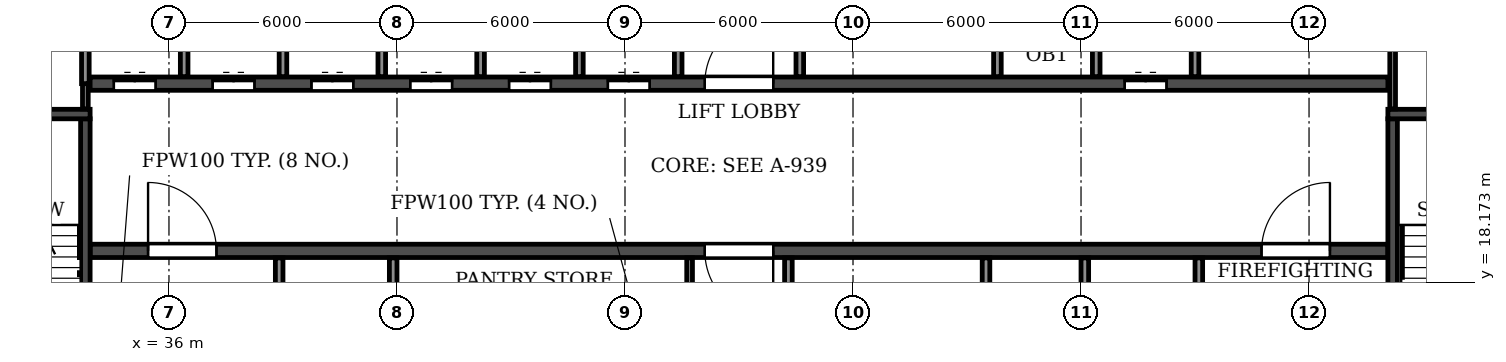
"""IFC4 building model, lengths in metres.
Left out: names, types, materials, properties, quantities, classifications, styles, units other than length and angle.
Written with IfcOpenShell. Run it as: python <this file> out.ifc"""

import sys

from ifc_helpers import new_model, si_unit, direction, frame, frame_2d, origin, place, context, subcontext, project, spatial, rectangle, extrude, element, fill, save


model = new_model("IFC4")
c1 = context("Model", 3, precision=1e-05, world=origin(), true_north=direction((0.0, 1.0)))
c2 = subcontext(c1, "Body", "Model", "MODEL_VIEW")
j1 = project(units=[si_unit("LENGTHUNIT", "METRE"), si_unit("PLANEANGLEUNIT", "RADIAN")], contexts=[c1])
p1 = place(None, origin())
s1 = spatial("IfcSite", under=j1, at=p1, CompositionType="ELEMENT")
p2 = place(p1, origin())
s2 = spatial("IfcBuilding", under=s1, at=p2, CompositionType="ELEMENT")
p3 = place(p2, frame((0.0, 0.0, 221.4)))
s3 = spatial("IfcBuildingStorey", under=s2, at=p3, CompositionType="ELEMENT", Elevation=221.4)
p4 = place(p3, frame((33.925, 19.0, 0.0), z_axis=(0.0, 0.0, 1.0), x_axis=(1.0, 0.0, 0.0)))
e1 = element("IfcWall", 1, at=p4, inside=s3, PredefinedType="SOLIDWALL", context=c2, shape_type="SweptSolid", body=[
    extrude(rectangle(XDim=34.15, YDim=0.35, at=frame_2d((17.075, 0.0))), origin(), (0.0, 0.0, 1.0), 3.08),
])
p5 = place(p4, frame((16.175, 0.0, 0.0)))
e2 = element("IfcOpeningElement", 2, at=p5, cuts=e1, PredefinedType="OPENING", context=c2, shape_type="SweptSolid", body=[
    extrude(rectangle(XDim=1.8, YDim=2.1, at=frame_2d((0.9, 1.05))), frame((0.0, 0.185, 0.0), z_axis=(0.0, -1.0, 0.0), x_axis=(1.0, 0.0, 0.0)), (0.0, 0.0, 1.0), 0.37),
])
p6 = place(p4, frame((1.525, 0.0, 0.0)))
e3 = element("IfcOpeningElement", 3, at=p6, cuts=e1, PredefinedType="OPENING", context=c2, shape_type="SweptSolid", body=[
    extrude(rectangle(XDim=1.8, YDim=2.1, at=frame_2d((0.9, 1.05))), frame((0.0, 0.185, 0.0), z_axis=(0.0, -1.0, 0.0), x_axis=(1.0, 0.0, 0.0)), (0.0, 0.0, 1.0), 0.37),
])
p7 = place(p4, frame((30.825, 0.0, 0.0)))
e4 = element("IfcOpeningElement", 4, at=p7, cuts=e1, PredefinedType="OPENING", context=c2, shape_type="SweptSolid", body=[
    extrude(rectangle(XDim=1.8, YDim=2.1, at=frame_2d((0.9, 1.05))), frame((0.0, 0.185, 0.0), z_axis=(0.0, -1.0, 0.0), x_axis=(1.0, 0.0, 0.0)), (0.0, 0.0, 1.0), 0.37),
])
p8 = place(p3, frame((33.925, 23.4, 0.0), z_axis=(0.0, 0.0, 1.0), x_axis=(1.0, 0.0, 0.0)))
e5 = element("IfcWall", 5, at=p8, inside=s3, PredefinedType="SOLIDWALL", context=c2, shape_type="SweptSolid", body=[
    extrude(rectangle(XDim=34.15, YDim=0.35, at=frame_2d((17.075, 0.0))), origin(), (0.0, 0.0, 1.0), 3.08),
])
p9 = place(p8, frame((16.175, 0.0, 0.0)))
e6 = element("IfcOpeningElement", 6, at=p9, cuts=e5, PredefinedType="OPENING", context=c2, shape_type="SweptSolid", body=[
    extrude(rectangle(XDim=1.8, YDim=2.1, at=frame_2d((0.9, 1.05))), frame((0.0, 0.185, 0.0), z_axis=(0.0, -1.0, 0.0), x_axis=(1.0, 0.0, 0.0)), (0.0, 0.0, 1.0), 0.37),
])
p10 = place(p8, frame((0.625, 0.0, 0.0)))
e7 = element("IfcOpeningElement", 7, at=p10, cuts=e5, PredefinedType="OPENING", context=c2, shape_type="SweptSolid", body=[
    extrude(rectangle(XDim=1.1, YDim=2.1, at=frame_2d((0.55, 1.05))), frame((0.0, 0.185, 0.0), z_axis=(0.0, -1.0, 0.0), x_axis=(1.0, 0.0, 0.0)), (0.0, 0.0, 1.0), 0.37),
])
p11 = place(p8, frame((3.225, 0.0, 0.0)))
e8 = element("IfcOpeningElement", 8, at=p11, cuts=e5, PredefinedType="OPENING", context=c2, shape_type="SweptSolid", body=[
    extrude(rectangle(XDim=1.1, YDim=2.1, at=frame_2d((0.55, 1.05))), frame((0.0, 0.185, 0.0), z_axis=(0.0, -1.0, 0.0), x_axis=(1.0, 0.0, 0.0)), (0.0, 0.0, 1.0), 0.37),
])
p12 = place(p8, frame((5.825, 0.0, 0.0)))
e9 = element("IfcOpeningElement", 9, at=p12, cuts=e5, PredefinedType="OPENING", context=c2, shape_type="SweptSolid", body=[
    extrude(rectangle(XDim=1.1, YDim=2.1, at=frame_2d((0.55, 1.05))), frame((0.0, 0.185, 0.0), z_axis=(0.0, -1.0, 0.0), x_axis=(1.0, 0.0, 0.0)), (0.0, 0.0, 1.0), 0.37),
])
p13 = place(p8, frame((8.425, 0.0, 0.0)))
e10 = element("IfcOpeningElement", 10, at=p13, cuts=e5, PredefinedType="OPENING", context=c2, shape_type="SweptSolid", body=[
    extrude(rectangle(XDim=1.1, YDim=2.1, at=frame_2d((0.55, 1.05))), frame((0.0, 0.185, 0.0), z_axis=(0.0, -1.0, 0.0), x_axis=(1.0, 0.0, 0.0)), (0.0, 0.0, 1.0), 0.37),
])
p14 = place(p8, frame((11.025, 0.0, 0.0)))
e11 = element("IfcOpeningElement", 11, at=p14, cuts=e5, PredefinedType="OPENING", context=c2, shape_type="SweptSolid", body=[
    extrude(rectangle(XDim=1.1, YDim=2.1, at=frame_2d((0.55, 1.05))), frame((0.0, 0.185, 0.0), z_axis=(0.0, -1.0, 0.0), x_axis=(1.0, 0.0, 0.0)), (0.0, 0.0, 1.0), 0.37),
])
p15 = place(p8, frame((13.625, 0.0, 0.0)))
e12 = element("IfcOpeningElement", 12, at=p15, cuts=e5, PredefinedType="OPENING", context=c2, shape_type="SweptSolid", body=[
    extrude(rectangle(XDim=1.1, YDim=2.1, at=frame_2d((0.55, 1.05))), frame((0.0, 0.185, 0.0), z_axis=(0.0, -1.0, 0.0), x_axis=(1.0, 0.0, 0.0)), (0.0, 0.0, 1.0), 0.37),
])
p16 = place(p8, frame((27.225, 0.0, 0.0)))
e13 = element("IfcOpeningElement", 13, at=p16, cuts=e5, PredefinedType="OPENING", context=c2, shape_type="SweptSolid", body=[
    extrude(rectangle(XDim=1.1, YDim=2.1, at=frame_2d((0.55, 1.05))), frame((0.0, 0.185, 0.0), z_axis=(0.0, -1.0, 0.0), x_axis=(1.0, 0.0, 0.0)), (0.0, 0.0, 1.0), 0.37),
])
p17 = place(p3, frame((33.8, 14.775, 0.0), z_axis=(0.0, 0.0, 1.0), x_axis=(0.0, 1.0, 0.0)))
e14 = element("IfcWall", 14, at=p17, inside=s3, PredefinedType="SOLIDWALL", context=c2, shape_type="SweptSolid", body=[
    extrude(rectangle(XDim=7.7, YDim=0.25, at=frame_2d((3.85, 0.0))), origin(), (0.0, 0.0, 1.0), 3.08),
])
p18 = place(p17, frame((0.525, 0.0, 0.0)))
e15 = element("IfcOpeningElement", 15, at=p18, cuts=e14, PredefinedType="OPENING", context=c2, shape_type="SweptSolid", body=[
    extrude(rectangle(XDim=1.0, YDim=2.1, at=frame_2d((0.5, 1.05))), frame((0.0, 0.135, 0.0), z_axis=(0.0, -1.0, 0.0), x_axis=(1.0, 0.0, 0.0)), (0.0, 0.0, 1.0), 0.27),
])
p19 = place(p3, frame((29.875, 22.6, 0.0), z_axis=(0.0, 0.0, 1.0), x_axis=(1.0, 0.0, 0.0)))
e16 = element("IfcWall", 16, at=p19, inside=s3, PredefinedType="SOLIDWALL", context=c2, shape_type="SweptSolid", body=[
    extrude(rectangle(XDim=4.05, YDim=0.25, at=frame_2d((2.025, 0.0))), origin(), (0.0, 0.0, 1.0), 3.08),
])
p20 = place(p3, frame((68.2, 14.775, 0.0), z_axis=(0.0, 0.0, 1.0), x_axis=(0.0, 1.0, 0.0)))
e17 = element("IfcWall", 17, at=p20, inside=s3, PredefinedType="SOLIDWALL", context=c2, shape_type="SweptSolid", body=[
    extrude(rectangle(XDim=7.7, YDim=0.25, at=frame_2d((3.85, 0.0))), origin(), (0.0, 0.0, 1.0), 3.08),
])
p21 = place(p20, frame((0.525, 0.0, 0.0)))
e18 = element("IfcOpeningElement", 18, at=p21, cuts=e17, PredefinedType="OPENING", context=c2, shape_type="SweptSolid", body=[
    extrude(rectangle(XDim=1.0, YDim=2.1, at=frame_2d((0.5, 1.05))), frame((0.0, 0.135, 0.0), z_axis=(0.0, -1.0, 0.0), x_axis=(1.0, 0.0, 0.0)), (0.0, 0.0, 1.0), 0.27),
])
p22 = place(p3, frame((68.075, 22.6, 0.0), z_axis=(0.0, 0.0, 1.0), x_axis=(1.0, 0.0, 0.0)))
e19 = element("IfcWall", 19, at=p22, inside=s3, PredefinedType="SOLIDWALL", context=c2, shape_type="SweptSolid", body=[
    extrude(rectangle(XDim=4.05, YDim=0.25, at=frame_2d((2.025, 0.0))), origin(), (0.0, 0.0, 1.0), 3.08),
])
p23 = place(p3, frame((49.7, 14.785, 0.0), z_axis=(0.0, 0.0, 1.0), x_axis=(0.0, 1.0, 0.0)))
e20 = element("IfcWall", 20, at=p23, inside=s3, PredefinedType="PARTITIONING", context=c2, shape_type="SweptSolid", body=[
    extrude(rectangle(XDim=4.03, YDim=0.15, at=frame_2d((2.015, 0.0))), origin(), (0.0, 0.0, 1.0), 3.08),
])
for number, where, z_axis, x_axis in (
    (21, (52.3, 14.785, 0.0), (0.0, 0.0, 1.0), (0.0, 1.0, 0.0)),
    (22, (52.6, 23.585, 0.0), (0.0, 0.0, 1.0), (0.0, 1.0, 0.0)),
    (23, (57.5, 14.785, 0.0), (0.0, 0.0, 1.0), (0.0, 1.0, 0.0)),
):
    element("IfcWall", number, at=place(p3, frame(where, z_axis=z_axis, x_axis=x_axis)), inside=s3, PredefinedType="PARTITIONING", context=c2, shape_type="SweptSolid", body=[
        extrude(rectangle(XDim=4.03, YDim=0.2, at=frame_2d((2.015, 0.0))), origin(), (0.0, 0.0, 1.0), 3.08),
    ])
p24 = place(p3, frame((33.8, 22.735, 0.0), z_axis=(0.0, 0.0, 1.0), x_axis=(0.0, 1.0, 0.0)))
e24 = element("IfcWall", 24, at=p24, inside=s3, PredefinedType="PARTITIONING", context=c2, shape_type="SweptSolid", body=[
    extrude(rectangle(XDim=0.665, YDim=0.15, at=frame_2d((0.333, 0.0))), origin(), (0.0, 0.0, 1.0), 3.08),
])
p25 = place(p3, frame((68.2, 22.735, 0.0), z_axis=(0.0, 0.0, 1.0), x_axis=(0.0, 1.0, 0.0)))
e25 = element("IfcWall", 25, at=p25, inside=s3, PredefinedType="PARTITIONING", context=c2, shape_type="SweptSolid", body=[
    extrude(rectangle(XDim=4.88, YDim=0.15, at=frame_2d((2.44, 0.0))), origin(), (0.0, 0.0, 1.0), 3.08),
])
p26 = place(p3, frame((33.8, 23.4, 0.0), z_axis=(0.0, 0.0, 1.0), x_axis=(0.0, 1.0, 0.0)))
e26 = element("IfcWall", 26, at=p26, inside=s3, PredefinedType="PARTITIONING", context=c2, shape_type="SweptSolid", body=[
    extrude(rectangle(XDim=2.7, YDim=0.2, at=frame_2d((1.35, 0.0))), origin(), (0.0, 0.0, 1.0), 3.08),
])
p27 = place(p3, frame((36.4, 23.585, 0.0), z_axis=(0.0, 0.0, 1.0), x_axis=(0.0, 1.0, 0.0)))
e27 = element("IfcWall", 27, at=p27, inside=s3, PredefinedType="PARTITIONING", context=c2, shape_type="SweptSolid", body=[
    extrude(rectangle(XDim=2.515, YDim=0.2, at=frame_2d((1.258, 0.0))), origin(), (0.0, 0.0, 1.0), 3.08),
])
p28 = place(p3, frame((38.9, 14.785, 0.0), z_axis=(0.0, 0.0, 1.0), x_axis=(0.0, 1.0, 0.0)))
e28 = element("IfcWall", 28, at=p28, inside=s3, PredefinedType="PARTITIONING", context=c2, shape_type="SweptSolid", body=[
    extrude(rectangle(XDim=4.03, YDim=0.2, at=frame_2d((2.015, 0.0))), origin(), (0.0, 0.0, 1.0), 3.08),
])
p29 = place(p28, frame((1.465, 0.0, 0.0)))
e29 = element("IfcOpeningElement", 29, at=p29, cuts=e28, PredefinedType="OPENING", context=c2, shape_type="SweptSolid", body=[
    extrude(rectangle(XDim=1.1, YDim=2.1, at=frame_2d((0.55, 1.05))), frame((0.0, 0.11, 0.0), z_axis=(0.0, -1.0, 0.0), x_axis=(1.0, 0.0, 0.0)), (0.0, 0.0, 1.0), 0.22),
])
for number, where, z_axis, x_axis in (
    (30, (39.0, 23.585, 0.0), (0.0, 0.0, 1.0), (0.0, 1.0, 0.0)),
    (31, (41.6, 23.585, 0.0), (0.0, 0.0, 1.0), (0.0, 1.0, 0.0)),
):
    element("IfcWall", number, at=place(p3, frame(where, z_axis=z_axis, x_axis=x_axis)), inside=s3, PredefinedType="PARTITIONING", context=c2, shape_type="SweptSolid", body=[
        extrude(rectangle(XDim=2.515, YDim=0.2, at=frame_2d((1.258, 0.0))), origin(), (0.0, 0.0, 1.0), 3.08),
    ])
for number, where, z_axis, x_axis in (
    (32, (41.9, 14.785, 0.0), (0.0, 0.0, 1.0), (0.0, 1.0, 0.0)),
    (33, (44.2, 23.585, 0.0), (0.0, 0.0, 1.0), (0.0, 1.0, 0.0)),
    (34, (46.8, 23.585, 0.0), (0.0, 0.0, 1.0), (0.0, 1.0, 0.0)),
):
    element("IfcWall", number, at=place(p3, frame(where, z_axis=z_axis, x_axis=x_axis)), inside=s3, PredefinedType="PARTITIONING", context=c2, shape_type="SweptSolid", body=[
        extrude(rectangle(XDim=4.03, YDim=0.2, at=frame_2d((2.015, 0.0))), origin(), (0.0, 0.0, 1.0), 3.08),
    ])
for number, where, z_axis, x_axis in (
    (35, (49.4, 23.585, 0.0), (0.0, 0.0, 1.0), (0.0, 1.0, 0.0)),
    (36, (57.8, 23.585, 0.0), (0.0, 0.0, 1.0), (0.0, 1.0, 0.0)),
):
    element("IfcWall", number, at=place(p3, frame(where, z_axis=z_axis, x_axis=x_axis)), inside=s3, PredefinedType="PARTITIONING", context=c2, shape_type="SweptSolid", body=[
        extrude(rectangle(XDim=2.515, YDim=0.2, at=frame_2d((1.258, 0.0))), origin(), (0.0, 0.0, 1.0), 3.08),
    ])
p30 = place(p3, frame((60.1, 14.785, 0.0), z_axis=(0.0, 0.0, 1.0), x_axis=(0.0, 1.0, 0.0)))
e37 = element("IfcWall", 37, at=p30, inside=s3, PredefinedType="PARTITIONING", context=c2, shape_type="SweptSolid", body=[
    extrude(rectangle(XDim=4.03, YDim=0.2, at=frame_2d((2.015, 0.0))), origin(), (0.0, 0.0, 1.0), 3.08),
])
for number, where, z_axis, x_axis in (
    (38, (60.4, 23.585, 0.0), (0.0, 0.0, 1.0), (0.0, 1.0, 0.0)),
    (39, (63.0, 23.585, 0.0), (0.0, 0.0, 1.0), (0.0, 1.0, 0.0)),
):
    element("IfcWall", number, at=place(p3, frame(where, z_axis=z_axis, x_axis=x_axis)), inside=s3, PredefinedType="PARTITIONING", context=c2, shape_type="SweptSolid", body=[
        extrude(rectangle(XDim=2.515, YDim=0.2, at=frame_2d((1.258, 0.0))), origin(), (0.0, 0.0, 1.0), 3.08),
    ])
p31 = place(p3, frame((63.1, 14.785, 0.0), z_axis=(0.0, 0.0, 1.0), x_axis=(0.0, 1.0, 0.0)))
e40 = element("IfcWall", 40, at=p31, inside=s3, PredefinedType="PARTITIONING", context=c2, shape_type="SweptSolid", body=[
    extrude(rectangle(XDim=4.03, YDim=0.2, at=frame_2d((2.015, 0.0))), origin(), (0.0, 0.0, 1.0), 3.08),
])
p32 = place(p31, frame((1.465, 0.0, 0.0)))
e41 = element("IfcOpeningElement", 41, at=p32, cuts=e40, PredefinedType="OPENING", context=c2, shape_type="SweptSolid", body=[
    extrude(rectangle(XDim=1.1, YDim=2.1, at=frame_2d((0.55, 1.05))), frame((0.0, 0.11, 0.0), z_axis=(0.0, -1.0, 0.0), x_axis=(1.0, 0.0, 0.0)), (0.0, 0.0, 1.0), 0.22),
])
p33 = place(p9, origin())
e42 = element("IfcDoor", 42, at=p33, inside=s3, OperationType="DOUBLE_DOOR_SINGLE_SWING", PredefinedType="DOOR", context=c2, shape_type="SweptSolid", body=[
    extrude(rectangle(XDim=1.8, YDim=2.1, at=frame_2d((0.9, 1.05))), frame((0.0, 0.025, 0.0), z_axis=(0.0, -1.0, 0.0), x_axis=(1.0, 0.0, 0.0)), (0.0, 0.0, 1.0), 0.05),
])
fill(e6, e42)
p34 = place(p5, frame((1.8, 0.0, 0.0), z_axis=(0.0, 0.0, 1.0), x_axis=(-1.0, 0.0, 0.0)))
e43 = element("IfcDoor", 43, at=p34, inside=s3, OperationType="DOUBLE_DOOR_SINGLE_SWING", PredefinedType="DOOR", context=c2, shape_type="SweptSolid", body=[
    extrude(rectangle(XDim=1.8, YDim=2.1, at=frame_2d((0.9, 1.05))), frame((0.0, 0.025, 0.0), z_axis=(0.0, -1.0, 0.0), x_axis=(1.0, 0.0, 0.0)), (0.0, 0.0, 1.0), 0.05),
])
fill(e2, e43)
p35 = place(p10, origin())
e44 = element("IfcDoor", 44, at=p35, inside=s3, OperationType="DOUBLE_DOOR_SLIDING", PredefinedType="DOOR", context=c2, shape_type="SweptSolid", body=[
    extrude(rectangle(XDim=1.1, YDim=2.1, at=frame_2d((0.55, 1.05))), frame((0.0, 0.025, 0.0), z_axis=(0.0, -1.0, 0.0), x_axis=(1.0, 0.0, 0.0)), (0.0, 0.0, 1.0), 0.05),
])
fill(e7, e44)
p36 = place(p6, origin())
e45 = element("IfcDoor", 45, at=p36, inside=s3, OperationType="DOUBLE_DOOR_SINGLE_SWING", PredefinedType="DOOR", context=c2, shape_type="SweptSolid", body=[
    extrude(rectangle(XDim=1.8, YDim=2.1, at=frame_2d((0.9, 1.05))), frame((0.0, 0.025, 0.0), z_axis=(0.0, -1.0, 0.0), x_axis=(1.0, 0.0, 0.0)), (0.0, 0.0, 1.0), 0.05),
])
fill(e3, e45)
p37 = place(p11, origin())
e46 = element("IfcDoor", 46, at=p37, inside=s3, OperationType="DOUBLE_DOOR_SLIDING", PredefinedType="DOOR", context=c2, shape_type="SweptSolid", body=[
    extrude(rectangle(XDim=1.1, YDim=2.1, at=frame_2d((0.55, 1.05))), frame((0.0, 0.025, 0.0), z_axis=(0.0, -1.0, 0.0), x_axis=(1.0, 0.0, 0.0)), (0.0, 0.0, 1.0), 0.05),
])
fill(e8, e46)
p38 = place(p12, origin())
e47 = element("IfcDoor", 47, at=p38, inside=s3, OperationType="DOUBLE_DOOR_SLIDING", PredefinedType="DOOR", context=c2, shape_type="SweptSolid", body=[
    extrude(rectangle(XDim=1.1, YDim=2.1, at=frame_2d((0.55, 1.05))), frame((0.0, 0.025, 0.0), z_axis=(0.0, -1.0, 0.0), x_axis=(1.0, 0.0, 0.0)), (0.0, 0.0, 1.0), 0.05),
])
fill(e9, e47)
p39 = place(p13, origin())
e48 = element("IfcDoor", 48, at=p39, inside=s3, OperationType="DOUBLE_DOOR_SLIDING", PredefinedType="DOOR", context=c2, shape_type="SweptSolid", body=[
    extrude(rectangle(XDim=1.1, YDim=2.1, at=frame_2d((0.55, 1.05))), frame((0.0, 0.025, 0.0), z_axis=(0.0, -1.0, 0.0), x_axis=(1.0, 0.0, 0.0)), (0.0, 0.0, 1.0), 0.05),
])
fill(e10, e48)
p40 = place(p14, origin())
e49 = element("IfcDoor", 49, at=p40, inside=s3, OperationType="DOUBLE_DOOR_SLIDING", PredefinedType="DOOR", context=c2, shape_type="SweptSolid", body=[
    extrude(rectangle(XDim=1.1, YDim=2.1, at=frame_2d((0.55, 1.05))), frame((0.0, 0.025, 0.0), z_axis=(0.0, -1.0, 0.0), x_axis=(1.0, 0.0, 0.0)), (0.0, 0.0, 1.0), 0.05),
])
fill(e11, e49)
p41 = place(p15, origin())
e50 = element("IfcDoor", 50, at=p41, inside=s3, OperationType="DOUBLE_DOOR_SLIDING", PredefinedType="DOOR", context=c2, shape_type="SweptSolid", body=[
    extrude(rectangle(XDim=1.1, YDim=2.1, at=frame_2d((0.55, 1.05))), frame((0.0, 0.025, 0.0), z_axis=(0.0, -1.0, 0.0), x_axis=(1.0, 0.0, 0.0)), (0.0, 0.0, 1.0), 0.05),
])
fill(e12, e50)
p42 = place(p16, origin())
e51 = element("IfcDoor", 51, at=p42, inside=s3, OperationType="DOUBLE_DOOR_SLIDING", PredefinedType="DOOR", context=c2, shape_type="SweptSolid", body=[
    extrude(rectangle(XDim=1.1, YDim=2.1, at=frame_2d((0.55, 1.05))), frame((0.0, 0.025, 0.0), z_axis=(0.0, -1.0, 0.0), x_axis=(1.0, 0.0, 0.0)), (0.0, 0.0, 1.0), 0.05),
])
fill(e13, e51)
p43 = place(p7, origin())
e52 = element("IfcDoor", 52, at=p43, inside=s3, OperationType="DOUBLE_DOOR_SINGLE_SWING", PredefinedType="DOOR", context=c2, shape_type="SweptSolid", body=[
    extrude(rectangle(XDim=1.8, YDim=2.1, at=frame_2d((0.9, 1.05))), frame((0.0, 0.025, 0.0), z_axis=(0.0, -1.0, 0.0), x_axis=(1.0, 0.0, 0.0)), (0.0, 0.0, 1.0), 0.05),
])
fill(e4, e52)
save(model, sys.argv[1])
